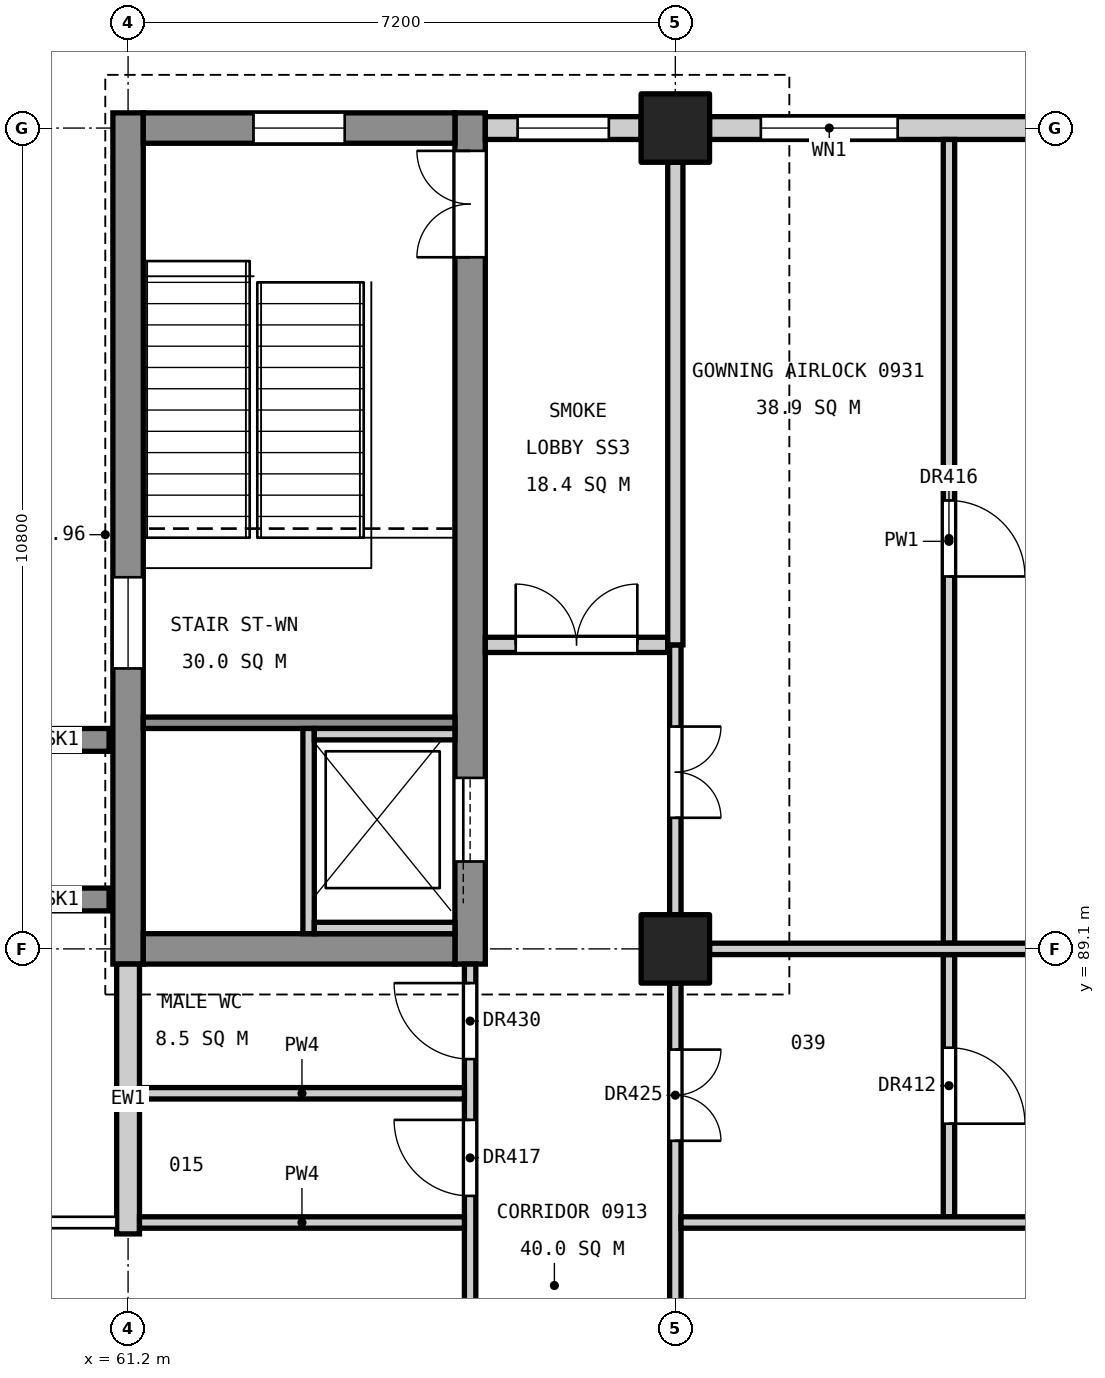
"""IFC4 building model, lengths in metres.
Left out: names, types, materials, properties, quantities, classifications, styles, units other than length and angle.
Written with IfcOpenShell. Run it as: python <this file> out.ifc"""

import sys

from ifc_helpers import new_model, si_unit, direction, frame, frame_2d, origin, origin_2d, place, context, subcontext, project, spatial, rectangle, extrude, element, fill, save


model = new_model("IFC4")
c1 = context("Model", 3, precision=1e-05, world=origin(), true_north=direction((0.0, 1.0)))
c2 = subcontext(c1, "Body", "Model", "MODEL_VIEW")
j1 = project(units=[si_unit("LENGTHUNIT", "METRE"), si_unit("PLANEANGLEUNIT", "RADIAN")], contexts=[c1])
p1 = place(None, origin())
s1 = spatial("IfcSite", under=j1, at=p1, CompositionType="ELEMENT")
p2 = place(p1, origin())
s2 = spatial("IfcBuilding", under=s1, at=p2, CompositionType="ELEMENT")
p3 = place(p2, frame((0.0, 0.0, 46.2)))
s3 = spatial("IfcBuildingStorey", under=s2, at=p3, CompositionType="ELEMENT", Elevation=46.2)
for number, where, z_axis, x_axis in (
    (1, (68.4, 89.1, 0.0), (0.0, 0.0, 1.0), (1.0, 0.0, 0.0)),
    (2, (68.4, 99.9, 0.0), (0.0, 0.0, 1.0), (1.0, 0.0, 0.0)),
):
    element("IfcColumn", number, at=place(p3, frame(where, z_axis=z_axis, x_axis=x_axis)), inside=s3, PredefinedType="COLUMN", context=c2, shape_type="SweptSolid", body=[
        extrude(rectangle(XDim=0.9, YDim=0.9, at=origin_2d()), origin(), (0.0, 0.0, 1.0), 4.8),
    ])
p4 = place(p3, frame((61.2, 88.9, 0.0), z_axis=(0.0, 0.0, 1.0), x_axis=(0.0, 1.0, 0.0)))
e3 = element("IfcWall", 3, at=p4, inside=s3, PredefinedType="SHEAR", context=c2, shape_type="SweptSolid", body=[
    extrude(rectangle(XDim=11.2, YDim=0.4, at=frame_2d((5.6, 0.0))), origin(), (0.0, 0.0, 1.0), 4.55),
])
p5 = place(p4, frame((3.89, 0.0, 3.4)))
e4 = element("IfcOpeningElement", 4, at=p5, cuts=e3, PredefinedType="OPENING", context=c2, shape_type="SweptSolid", body=[
    extrude(rectangle(XDim=1.2, YDim=0.9, at=frame_2d((0.6, 0.45))), frame((0.0, 0.21, 0.0), z_axis=(0.0, -1.0, 0.0), x_axis=(1.0, 0.0, 0.0)), (0.0, 0.0, 1.0), 0.42),
])
p6 = place(p3, frame((65.7, 88.9, 0.0), z_axis=(0.0, 0.0, 1.0), x_axis=(0.0, 1.0, 0.0)))
e5 = element("IfcWall", 5, at=p6, inside=s3, PredefinedType="SHEAR", context=c2, shape_type="SweptSolid", body=[
    extrude(rectangle(XDim=11.2, YDim=0.4, at=frame_2d((5.6, 0.0))), origin(), (0.0, 0.0, 1.0), 4.55),
])
p7 = place(p6, frame((9.3, 0.0, 0.0)))
e6 = element("IfcOpeningElement", 6, at=p7, cuts=e5, PredefinedType="OPENING", context=c2, shape_type="SweptSolid", body=[
    extrude(rectangle(XDim=1.4, YDim=2.1, at=frame_2d((0.7, 1.05))), frame((0.0, 0.21, 0.0), z_axis=(0.0, -1.0, 0.0), x_axis=(1.0, 0.0, 0.0)), (0.0, 0.0, 1.0), 0.42),
])
p8 = place(p6, frame((1.35, 0.0, 0.0)))
e7 = element("IfcOpeningElement", 7, at=p8, cuts=e5, PredefinedType="OPENING", context=c2, shape_type="SweptSolid", body=[
    extrude(rectangle(XDim=1.1, YDim=2.1, at=frame_2d((0.55, 1.05))), frame((0.0, 0.21, 0.0), z_axis=(0.0, -1.0, 0.0), x_axis=(1.0, 0.0, 0.0)), (0.0, 0.0, 1.0), 0.42),
])
p9 = place(p3, frame((61.4, 89.1, 0.0), z_axis=(0.0, 0.0, 1.0), x_axis=(1.0, 0.0, 0.0)))
e8 = element("IfcWall", 8, at=p9, inside=s3, PredefinedType="SHEAR", context=c2, shape_type="SweptSolid", body=[
    extrude(rectangle(XDim=4.1, YDim=0.4, at=frame_2d((2.05, 0.0))), origin(), (0.0, 0.0, 1.0), 4.55),
])
p10 = place(p3, frame((61.4, 99.9, 0.0), z_axis=(0.0, 0.0, 1.0), x_axis=(1.0, 0.0, 0.0)))
e9 = element("IfcWall", 9, at=p10, inside=s3, PredefinedType="SHEAR", context=c2, shape_type="SweptSolid", body=[
    extrude(rectangle(XDim=4.1, YDim=0.4, at=frame_2d((2.05, 0.0))), origin(), (0.0, 0.0, 1.0), 4.55),
])
p11 = place(p10, frame((1.45, 0.0, 3.4)))
e10 = element("IfcOpeningElement", 10, at=p11, cuts=e9, PredefinedType="OPENING", context=c2, shape_type="SweptSolid", body=[
    extrude(rectangle(XDim=1.2, YDim=0.9, at=frame_2d((0.6, 0.45))), frame((0.0, 0.21, 0.0), z_axis=(0.0, -1.0, 0.0), x_axis=(1.0, 0.0, 0.0)), (0.0, 0.0, 1.0), 0.42),
])
for number, where, z_axis, x_axis in (
    (11, (60.95, 89.75, 0.0), (0.0, 0.0, 1.0), (-1.0, 0.0, 0.0)),
    (12, (60.95, 91.85, 0.0), (0.0, 0.0, 1.0), (-1.0, 0.0, 0.0)),
):
    element("IfcWall", number, at=place(p3, frame(where, z_axis=z_axis, x_axis=x_axis)), inside=s3, PredefinedType="SHEAR", context=c2, shape_type="SweptSolid", body=[
        extrude(rectangle(XDim=1.25, YDim=0.3, at=frame_2d((0.625, 0.0))), origin(), (0.0, 0.0, 1.0), 4.8),
    ])
p12 = place(p3, frame((61.4, 92.075, 0.0), z_axis=(0.0, 0.0, 1.0), x_axis=(1.0, 0.0, 0.0)))
e13 = element("IfcWall", 13, at=p12, inside=s3, PredefinedType="SOLIDWALL", context=c2, shape_type="SweptSolid", body=[
    extrude(rectangle(XDim=4.1, YDim=0.15, at=frame_2d((2.05, 0.0))), origin(), (0.0, 0.0, 1.0), 4.55),
])
p13 = place(p3, frame((63.575, 92.0, 0.0), z_axis=(0.0, 0.0, 1.0), x_axis=(0.0, -1.0, 0.0)))
e14 = element("IfcWall", 14, at=p13, inside=s3, PredefinedType="SOLIDWALL", context=c2, shape_type="SweptSolid", body=[
    extrude(rectangle(XDim=2.7, YDim=0.15, at=frame_2d((1.35, 0.0))), origin(), (0.0, 0.0, 1.0), 4.8),
])
for number, where, z_axis, x_axis in (
    (15, (63.65, 91.925, 0.0), (0.0, 0.0, 1.0), (1.0, 0.0, 0.0)),
    (16, (63.65, 89.375, 0.0), (0.0, 0.0, 1.0), (1.0, 0.0, 0.0)),
):
    element("IfcWall", number, at=place(p3, frame(where, z_axis=z_axis, x_axis=x_axis)), inside=s3, PredefinedType="SOLIDWALL", context=c2, shape_type="SweptSolid", body=[
        extrude(rectangle(XDim=1.85, YDim=0.15, at=frame_2d((0.925, 0.0))), origin(), (0.0, 0.0, 1.0), 4.8),
    ])
p14 = place(p3, frame((61.2, 85.35, 0.0), z_axis=(0.0, 0.0, 1.0), x_axis=(0.0, 1.0, 0.0)))
e17 = element("IfcWall", 17, at=p14, inside=s3, PredefinedType="STANDARD", context=c2, shape_type="SweptSolid", body=[
    extrude(rectangle(XDim=3.55, YDim=0.3, at=frame_2d((1.775, 0.0))), origin(), (0.0, 0.0, 1.0), 3.65),
])
p15 = place(p3, frame((65.9, 99.9, 0.0), z_axis=(0.0, 0.0, 1.0), x_axis=(1.0, 0.0, 0.0)))
e18 = element("IfcWall", 18, at=p15, inside=s3, PredefinedType="STANDARD", context=c2, shape_type="SweptSolid", body=[
    extrude(rectangle(XDim=2.05, YDim=0.3, at=frame_2d((1.025, 0.0))), origin(), (0.0, 0.0, 1.0), 3.85),
])
p16 = place(p15, frame((0.425, 0.0, 0.9)))
e19 = element("IfcOpeningElement", 19, at=p16, cuts=e18, PredefinedType="OPENING", context=c2, shape_type="SweptSolid", body=[
    extrude(rectangle(XDim=1.2, YDim=2.4, at=frame_2d((0.6, 1.2))), frame((0.0, 0.16, 0.0), z_axis=(0.0, -1.0, 0.0), x_axis=(1.0, 0.0, 0.0)), (0.0, 0.0, 1.0), 0.32),
])
p17 = place(p3, frame((68.85, 99.9, 0.0), z_axis=(0.0, 0.0, 1.0), x_axis=(1.0, 0.0, 0.0)))
e20 = element("IfcWall", 20, at=p17, inside=s3, PredefinedType="STANDARD", context=c2, shape_type="SweptSolid", body=[
    extrude(rectangle(XDim=9.9, YDim=0.3, at=frame_2d((4.95, 0.0))), origin(), (0.0, 0.0, 1.0), 3.85),
])
p18 = place(p17, frame((0.675, 0.0, 0.9)))
e21 = element("IfcOpeningElement", 21, at=p18, cuts=e20, PredefinedType="OPENING", context=c2, shape_type="SweptSolid", body=[
    extrude(rectangle(XDim=1.8, YDim=2.4, at=frame_2d((0.9, 1.2))), frame((0.0, 0.16, 0.0), z_axis=(0.0, -1.0, 0.0), x_axis=(1.0, 0.0, 0.0)), (0.0, 0.0, 1.0), 0.32),
])
p19 = place(p17, frame((4.575, 0.0, 0.8)))
e22 = element("IfcOpeningElement", 22, at=p19, cuts=e20, PredefinedType="OPENING", context=c2, shape_type="SweptSolid", body=[
    extrude(rectangle(XDim=0.75, YDim=1.2, at=frame_2d((0.375, 0.6))), frame((0.0, 0.16, 0.0), z_axis=(0.0, -1.0, 0.0), x_axis=(1.0, 0.0, 0.0)), (0.0, 0.0, 1.0), 0.32),
])
p20 = place(p17, frame((7.425, 0.0, 0.9)))
e23 = element("IfcOpeningElement", 23, at=p20, cuts=e20, PredefinedType="OPENING", context=c2, shape_type="SweptSolid", body=[
    extrude(rectangle(XDim=1.8, YDim=2.4, at=frame_2d((0.9, 1.2))), frame((0.0, 0.16, 0.0), z_axis=(0.0, -1.0, 0.0), x_axis=(1.0, 0.0, 0.0)), (0.0, 0.0, 1.0), 0.32),
])
p21 = place(p3, frame((65.7, 78.45, 0.0), z_axis=(0.0, 0.0, 1.0), x_axis=(0.0, 1.0, 0.0)))
e24 = element("IfcWall", 24, at=p21, inside=s3, PredefinedType="PARTITIONING", context=c2, shape_type="SweptSolid", body=[
    extrude(rectangle(XDim=10.45, YDim=0.15, at=frame_2d((5.225, 0.0))), origin(), (0.0, 0.0, 1.0), 3.55),
])
p22 = place(p21, frame((7.4, 0.0, 0.0)))
e25 = element("IfcOpeningElement", 25, at=p22, cuts=e24, PredefinedType="OPENING", context=c2, shape_type="SweptSolid", body=[
    extrude(rectangle(XDim=1.0, YDim=2.1, at=frame_2d((0.5, 1.05))), frame((0.0, 0.085, 0.0), z_axis=(0.0, -1.0, 0.0), x_axis=(1.0, 0.0, 0.0)), (0.0, 0.0, 1.0), 0.17),
])
p23 = place(p21, frame((9.2, 0.0, 0.0)))
e26 = element("IfcOpeningElement", 26, at=p23, cuts=e24, PredefinedType="OPENING", context=c2, shape_type="SweptSolid", body=[
    extrude(rectangle(XDim=1.0, YDim=2.1, at=frame_2d((0.5, 1.05))), frame((0.0, 0.085, 0.0), z_axis=(0.0, -1.0, 0.0), x_axis=(1.0, 0.0, 0.0)), (0.0, 0.0, 1.0), 0.17),
])
p24 = place(p21, frame((2.95, 0.0, 0.0)))
e27 = element("IfcOpeningElement", 27, at=p24, cuts=e24, PredefinedType="OPENING", context=c2, shape_type="SweptSolid", body=[
    extrude(rectangle(XDim=1.0, YDim=2.1, at=frame_2d((0.5, 1.05))), frame((0.0, 0.085, 0.0), z_axis=(0.0, -1.0, 0.0), x_axis=(1.0, 0.0, 0.0)), (0.0, 0.0, 1.0), 0.17),
])
p25 = place(p3, frame((61.35, 85.5, 0.0), z_axis=(0.0, 0.0, 1.0), x_axis=(1.0, 0.0, 0.0)))
e28 = element("IfcWall", 28, at=p25, inside=s3, PredefinedType="PARTITIONING", context=c2, shape_type="SweptSolid", body=[
    extrude(rectangle(XDim=4.275, YDim=0.15, at=frame_2d((2.137, 0.0))), origin(), (0.0, 0.0, 1.0), 3.85),
])
p26 = place(p3, frame((61.35, 87.2, 0.0), z_axis=(0.0, 0.0, 1.0), x_axis=(1.0, 0.0, 0.0)))
e29 = element("IfcWall", 29, at=p26, inside=s3, PredefinedType="PARTITIONING", context=c2, shape_type="SweptSolid", body=[
    extrude(rectangle(XDim=4.275, YDim=0.15, at=frame_2d((2.137, 0.0))), origin(), (0.0, 0.0, 1.0), 3.55),
])
p27 = place(p3, frame((65.9, 93.1, 0.0), z_axis=(0.0, 0.0, 1.0), x_axis=(1.0, 0.0, 0.0)))
e30 = element("IfcWall", 30, at=p27, inside=s3, PredefinedType="PARTITIONING", context=c2, shape_type="SweptSolid", body=[
    extrude(rectangle(XDim=2.4, YDim=0.2, at=frame_2d((1.2, 0.0))), origin(), (0.0, 0.0, 1.0), 3.55),
])
p28 = place(p27, frame((0.4, 0.0, 0.0)))
e31 = element("IfcOpeningElement", 31, at=p28, cuts=e30, PredefinedType="OPENING", context=c2, shape_type="SweptSolid", body=[
    extrude(rectangle(XDim=1.6, YDim=2.1, at=frame_2d((0.8, 1.05))), frame((0.0, 0.11, 0.0), z_axis=(0.0, -1.0, 0.0), x_axis=(1.0, 0.0, 0.0)), (0.0, 0.0, 1.0), 0.22),
])
p29 = place(p3, frame((68.4, 78.75, 0.0), z_axis=(0.0, 0.0, 1.0), x_axis=(0.0, 1.0, 0.0)))
e32 = element("IfcWall", 32, at=p29, inside=s3, PredefinedType="PARTITIONING", context=c2, shape_type="SweptSolid", body=[
    extrude(rectangle(XDim=9.9, YDim=0.15, at=frame_2d((4.95, 0.0))), origin(), (0.0, 0.0, 1.0), 3.55),
])
p30 = place(p29, frame((1.075, 0.0, 0.0)))
e33 = element("IfcOpeningElement", 33, at=p30, cuts=e32, PredefinedType="OPENING", context=c2, shape_type="SweptSolid", body=[
    extrude(rectangle(XDim=1.2, YDim=2.1, at=frame_2d((0.6, 1.05))), frame((0.0, 0.085, 0.0), z_axis=(0.0, -1.0, 0.0), x_axis=(1.0, 0.0, 0.0)), (0.0, 0.0, 1.0), 0.17),
])
p31 = place(p29, frame((7.825, 0.0, 0.0)))
e34 = element("IfcOpeningElement", 34, at=p31, cuts=e32, PredefinedType="OPENING", context=c2, shape_type="SweptSolid", body=[
    extrude(rectangle(XDim=1.2, YDim=2.1, at=frame_2d((0.6, 1.05))), frame((0.0, 0.085, 0.0), z_axis=(0.0, -1.0, 0.0), x_axis=(1.0, 0.0, 0.0)), (0.0, 0.0, 1.0), 0.17),
])
p32 = place(p29, frame((4.35, 0.0, 0.0)))
e35 = element("IfcOpeningElement", 35, at=p32, cuts=e32, PredefinedType="OPENING", context=c2, shape_type="SweptSolid", body=[
    extrude(rectangle(XDim=1.2, YDim=2.1, at=frame_2d((0.6, 1.05))), frame((0.0, 0.085, 0.0), z_axis=(0.0, -1.0, 0.0), x_axis=(1.0, 0.0, 0.0)), (0.0, 0.0, 1.0), 0.17),
])
p33 = place(p3, frame((68.4, 89.55, 0.0), z_axis=(0.0, 0.0, 1.0), x_axis=(0.0, 1.0, 0.0)))
e36 = element("IfcWall", 36, at=p33, inside=s3, PredefinedType="PARTITIONING", context=c2, shape_type="SweptSolid", body=[
    extrude(rectangle(XDim=3.55, YDim=0.15, at=frame_2d((1.775, 0.0))), origin(), (0.0, 0.0, 1.0), 3.55),
])
p34 = place(p33, frame((1.275, 0.0, 0.0)))
e37 = element("IfcOpeningElement", 37, at=p34, cuts=e36, PredefinedType="OPENING", context=c2, shape_type="SweptSolid", body=[
    extrude(rectangle(XDim=1.2, YDim=2.1, at=frame_2d((0.6, 1.05))), frame((0.0, 0.085, 0.0), z_axis=(0.0, -1.0, 0.0), x_axis=(1.0, 0.0, 0.0)), (0.0, 0.0, 1.0), 0.17),
])
p35 = place(p3, frame((68.4, 93.1, 0.0), z_axis=(0.0, 0.0, 1.0), x_axis=(0.0, 1.0, 0.0)))
e38 = element("IfcWall", 38, at=p35, inside=s3, PredefinedType="PARTITIONING", context=c2, shape_type="SweptSolid", body=[
    extrude(rectangle(XDim=6.35, YDim=0.2, at=frame_2d((3.175, 0.0))), origin(), (0.0, 0.0, 1.0), 3.55),
])
p36 = place(p3, frame((72.0, 85.575, 0.0), z_axis=(0.0, 0.0, 1.0), x_axis=(0.0, 1.0, 0.0)))
e39 = element("IfcWall", 39, at=p36, inside=s3, PredefinedType="PARTITIONING", context=c2, shape_type="SweptSolid", body=[
    extrude(rectangle(XDim=3.45, YDim=0.15, at=frame_2d((1.725, 0.0))), origin(), (0.0, 0.0, 1.0), 3.55),
])
p37 = place(p36, frame((1.225, 0.0, 0.0)))
e40 = element("IfcOpeningElement", 40, at=p37, cuts=e39, PredefinedType="OPENING", context=c2, shape_type="SweptSolid", body=[
    extrude(rectangle(XDim=1.0, YDim=2.1, at=frame_2d((0.5, 1.05))), frame((0.0, 0.085, 0.0), z_axis=(0.0, -1.0, 0.0), x_axis=(1.0, 0.0, 0.0)), (0.0, 0.0, 1.0), 0.17),
])
p38 = place(p3, frame((72.0, 89.175, 0.0), z_axis=(0.0, 0.0, 1.0), x_axis=(0.0, 1.0, 0.0)))
e41 = element("IfcWall", 41, at=p38, inside=s3, PredefinedType="PARTITIONING", context=c2, shape_type="SweptSolid", body=[
    extrude(rectangle(XDim=10.575, YDim=0.15, at=frame_2d((5.288, 0.0))), origin(), (0.0, 0.0, 1.0), 3.55),
])
p39 = place(p38, frame((4.825, 0.0, 0.0)))
e42 = element("IfcOpeningElement", 42, at=p39, cuts=e41, PredefinedType="OPENING", context=c2, shape_type="SweptSolid", body=[
    extrude(rectangle(XDim=1.0, YDim=2.1, at=frame_2d((0.5, 1.05))), frame((0.0, 0.085, 0.0), z_axis=(0.0, -1.0, 0.0), x_axis=(1.0, 0.0, 0.0)), (0.0, 0.0, 1.0), 0.17),
])
p40 = place(p3, frame((68.475, 85.5, 0.0), z_axis=(0.0, 0.0, 1.0), x_axis=(1.0, 0.0, 0.0)))
e43 = element("IfcWall", 43, at=p40, inside=s3, PredefinedType="PARTITIONING", context=c2, shape_type="SweptSolid", body=[
    extrude(rectangle(XDim=10.575, YDim=0.15, at=frame_2d((5.288, 0.0))), origin(), (0.0, 0.0, 1.0), 3.85),
])
p41 = place(p3, frame((68.85, 89.1, 0.0), z_axis=(0.0, 0.0, 1.0), x_axis=(1.0, 0.0, 0.0)))
e44 = element("IfcWall", 44, at=p41, inside=s3, PredefinedType="PARTITIONING", context=c2, shape_type="SweptSolid", body=[
    extrude(rectangle(XDim=9.9, YDim=0.15, at=frame_2d((4.95, 0.0))), origin(), (0.0, 0.0, 1.0), 3.85),
])
p42 = place(p7, origin())
e45 = element("IfcDoor", 45, at=p42, inside=s3, OperationType="DOUBLE_DOOR_SINGLE_SWING", PredefinedType="DOOR", context=c2, shape_type="SweptSolid", body=[
    extrude(rectangle(XDim=1.4, YDim=2.1, at=frame_2d((0.7, 1.05))), frame((0.0, 0.025, 0.0), z_axis=(0.0, -1.0, 0.0), x_axis=(1.0, 0.0, 0.0)), (0.0, 0.0, 1.0), 0.05),
])
fill(e6, e45)
p43 = place(p8, origin())
e46 = element("IfcDoor", 46, at=p43, inside=s3, OperationType="SLIDING_TO_LEFT", PredefinedType="DOOR", context=c2, shape_type="SweptSolid", body=[
    extrude(rectangle(XDim=1.1, YDim=2.1, at=frame_2d((0.55, 1.05))), frame((0.0, 0.025, 0.0), z_axis=(0.0, -1.0, 0.0), x_axis=(1.0, 0.0, 0.0)), (0.0, 0.0, 1.0), 0.05),
])
fill(e7, e46)
p44 = place(p16, origin())
e47 = element("IfcWindow", 47, at=p44, inside=s3, PartitioningType="SINGLE_PANEL", PredefinedType="WINDOW", context=c2, shape_type="SweptSolid", body=[
    extrude(rectangle(XDim=1.2, YDim=2.4, at=frame_2d((0.6, 1.2))), frame((0.0, 0.03, 0.0), z_axis=(0.0, -1.0, 0.0), x_axis=(1.0, 0.0, 0.0)), (0.0, 0.0, 1.0), 0.06),
])
fill(e19, e47)
p45 = place(p18, origin())
e48 = element("IfcWindow", 48, at=p45, inside=s3, PartitioningType="SINGLE_PANEL", PredefinedType="WINDOW", context=c2, shape_type="SweptSolid", body=[
    extrude(rectangle(XDim=1.8, YDim=2.4, at=frame_2d((0.9, 1.2))), frame((0.0, 0.03, 0.0), z_axis=(0.0, -1.0, 0.0), x_axis=(1.0, 0.0, 0.0)), (0.0, 0.0, 1.0), 0.06),
])
fill(e21, e48)
p46 = place(p5, origin())
e49 = element("IfcWindow", 49, at=p46, inside=s3, PartitioningType="SINGLE_PANEL", PredefinedType="WINDOW", context=c2, shape_type="SweptSolid", body=[
    extrude(rectangle(XDim=1.2, YDim=0.9, at=frame_2d((0.6, 0.45))), frame((0.0, 0.03, 0.0), z_axis=(0.0, -1.0, 0.0), x_axis=(1.0, 0.0, 0.0)), (0.0, 0.0, 1.0), 0.06),
])
fill(e4, e49)
p47 = place(p11, origin())
e50 = element("IfcWindow", 50, at=p47, inside=s3, PartitioningType="SINGLE_PANEL", PredefinedType="WINDOW", context=c2, shape_type="SweptSolid", body=[
    extrude(rectangle(XDim=1.2, YDim=0.9, at=frame_2d((0.6, 0.45))), frame((0.0, 0.03, 0.0), z_axis=(0.0, -1.0, 0.0), x_axis=(1.0, 0.0, 0.0)), (0.0, 0.0, 1.0), 0.06),
])
fill(e10, e50)
p48 = place(p37, frame((1.0, 0.0, 0.0), z_axis=(0.0, 0.0, 1.0), x_axis=(-1.0, 0.0, 0.0)))
e51 = element("IfcDoor", 51, at=p48, inside=s3, OperationType="SINGLE_SWING_RIGHT", PredefinedType="DOOR", context=c2, shape_type="SweptSolid", body=[
    extrude(rectangle(XDim=1.0, YDim=2.1, at=frame_2d((0.5, 1.05))), frame((0.0, 0.025, 0.0), z_axis=(0.0, -1.0, 0.0), x_axis=(1.0, 0.0, 0.0)), (0.0, 0.0, 1.0), 0.05),
])
fill(e40, e51)
p49 = place(p39, frame((1.0, 0.0, 0.0), z_axis=(0.0, 0.0, 1.0), x_axis=(-1.0, 0.0, 0.0)))
e52 = element("IfcDoor", 52, at=p49, inside=s3, OperationType="SINGLE_SWING_RIGHT", PredefinedType="DOOR", context=c2, shape_type="SweptSolid", body=[
    extrude(rectangle(XDim=1.0, YDim=2.1, at=frame_2d((0.5, 1.05))), frame((0.0, 0.025, 0.0), z_axis=(0.0, -1.0, 0.0), x_axis=(1.0, 0.0, 0.0)), (0.0, 0.0, 1.0), 0.05),
])
fill(e42, e52)
p50 = place(p22, origin())
e53 = element("IfcDoor", 53, at=p50, inside=s3, OperationType="SINGLE_SWING_RIGHT", PredefinedType="DOOR", context=c2, shape_type="SweptSolid", body=[
    extrude(rectangle(XDim=1.0, YDim=2.1, at=frame_2d((0.5, 1.05))), frame((0.0, 0.025, 0.0), z_axis=(0.0, -1.0, 0.0), x_axis=(1.0, 0.0, 0.0)), (0.0, 0.0, 1.0), 0.05),
])
fill(e25, e53)
p51 = place(p31, frame((1.2, 0.0, 0.0), z_axis=(0.0, 0.0, 1.0), x_axis=(-1.0, 0.0, 0.0)))
e54 = element("IfcDoor", 54, at=p51, inside=s3, OperationType="DOUBLE_DOOR_SINGLE_SWING", PredefinedType="DOOR", context=c2, shape_type="SweptSolid", body=[
    extrude(rectangle(XDim=1.2, YDim=2.1, at=frame_2d((0.6, 1.05))), frame((0.0, 0.025, 0.0), z_axis=(0.0, -1.0, 0.0), x_axis=(1.0, 0.0, 0.0)), (0.0, 0.0, 1.0), 0.05),
])
fill(e34, e54)
p52 = place(p34, frame((1.2, 0.0, 0.0), z_axis=(0.0, 0.0, 1.0), x_axis=(-1.0, 0.0, 0.0)))
e55 = element("IfcDoor", 55, at=p52, inside=s3, OperationType="DOUBLE_DOOR_SINGLE_SWING", PredefinedType="DOOR", context=c2, shape_type="SweptSolid", body=[
    extrude(rectangle(XDim=1.2, YDim=2.1, at=frame_2d((0.6, 1.05))), frame((0.0, 0.025, 0.0), z_axis=(0.0, -1.0, 0.0), x_axis=(1.0, 0.0, 0.0)), (0.0, 0.0, 1.0), 0.05),
])
fill(e37, e55)
p53 = place(p23, origin())
e56 = element("IfcDoor", 56, at=p53, inside=s3, OperationType="SINGLE_SWING_RIGHT", PredefinedType="DOOR", context=c2, shape_type="SweptSolid", body=[
    extrude(rectangle(XDim=1.0, YDim=2.1, at=frame_2d((0.5, 1.05))), frame((0.0, 0.025, 0.0), z_axis=(0.0, -1.0, 0.0), x_axis=(1.0, 0.0, 0.0)), (0.0, 0.0, 1.0), 0.05),
])
fill(e26, e56)
p54 = place(p28, origin())
e57 = element("IfcDoor", 57, at=p54, inside=s3, OperationType="DOUBLE_DOOR_SINGLE_SWING", PredefinedType="DOOR", context=c2, shape_type="SweptSolid", body=[
    extrude(rectangle(XDim=1.6, YDim=2.1, at=frame_2d((0.8, 1.05))), frame((0.0, 0.025, 0.0), z_axis=(0.0, -1.0, 0.0), x_axis=(1.0, 0.0, 0.0)), (0.0, 0.0, 1.0), 0.05),
])
fill(e31, e57)
save(model, sys.argv[1])
